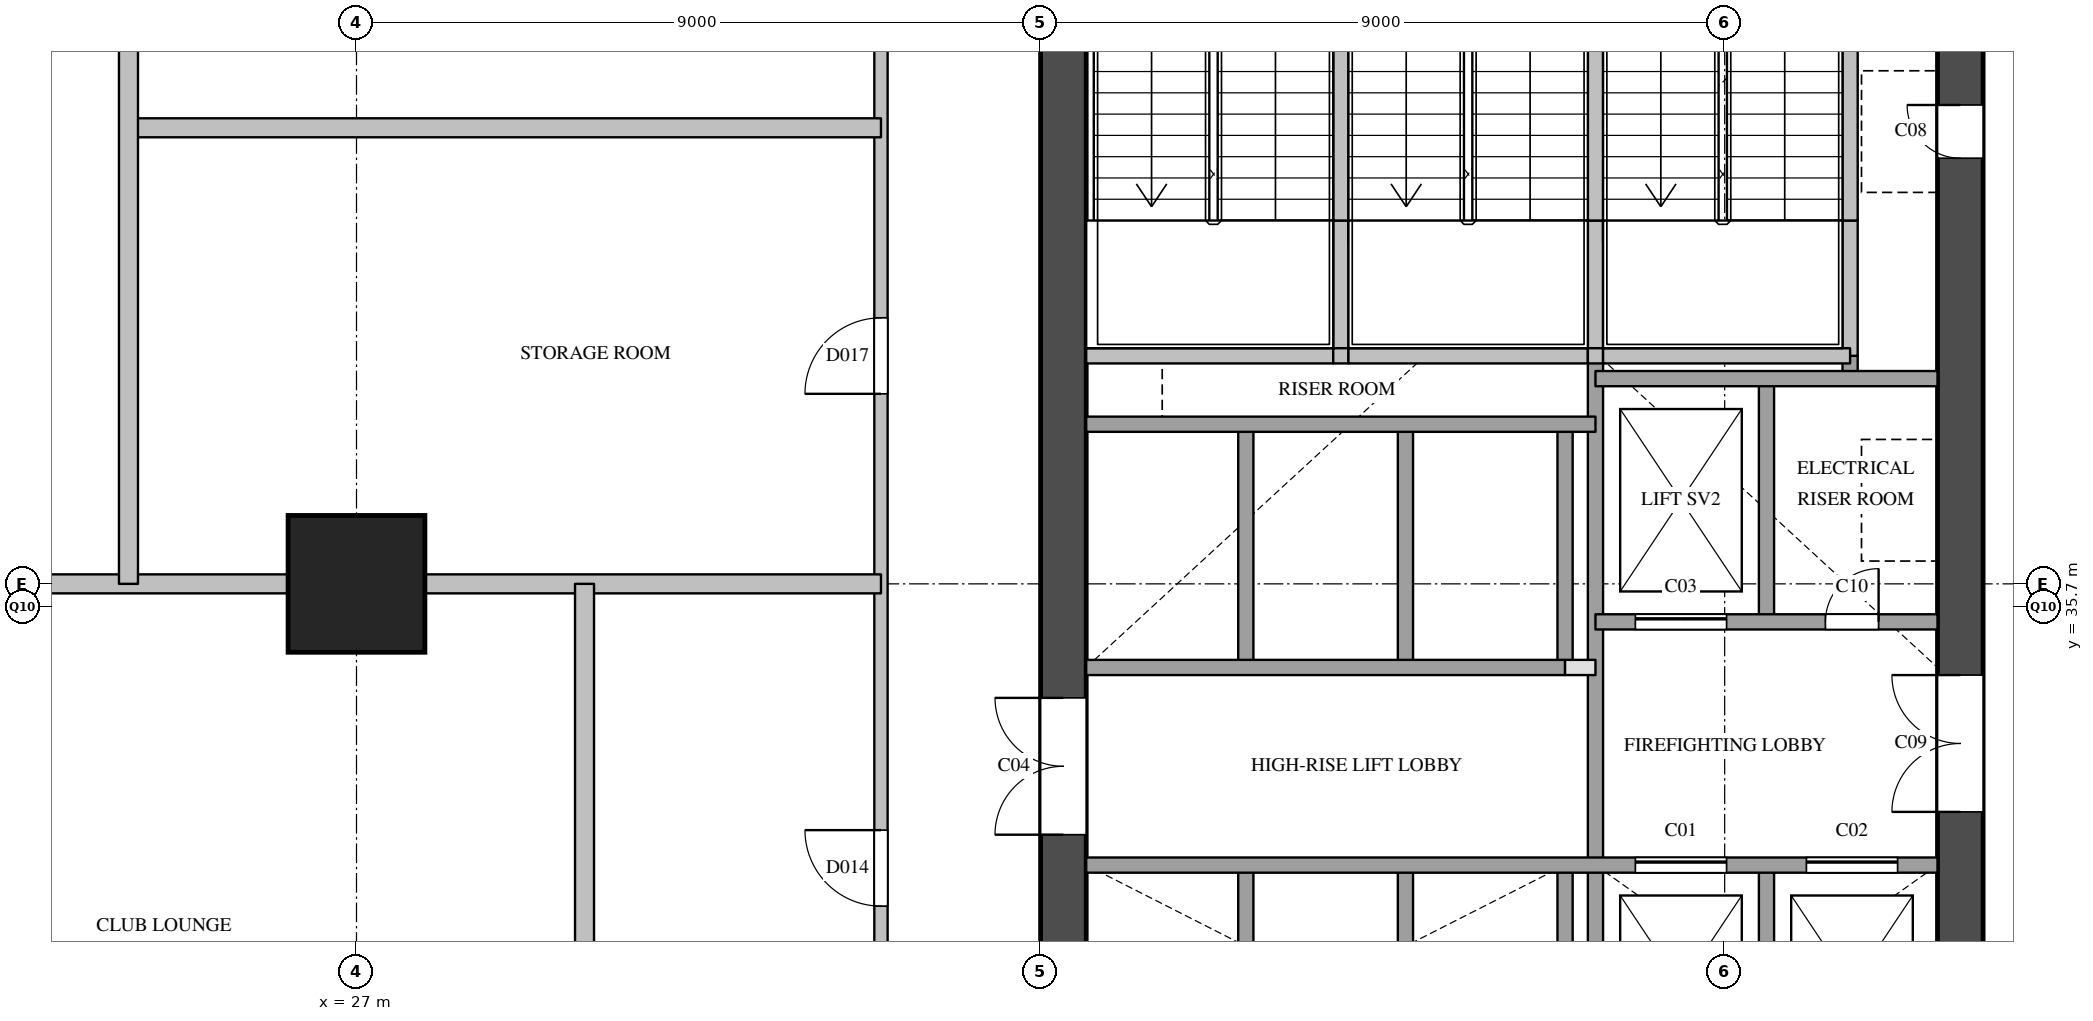
"""IFC4 building model, lengths in metres.
Left out: names, types, materials, properties, quantities, classifications, styles, units other than length and angle.
Written with IfcOpenShell. Run it as: python <this file> out.ifc"""

import sys

from ifc_helpers import new_model, si_unit, direction, frame, frame_2d, origin, origin_2d, place, context, subcontext, project, spatial, rectangle, extrude, element, fill, save


model = new_model("IFC4")
c1 = context("Model", 3, precision=1e-05, world=origin(), true_north=direction((0.0, 1.0)))
c2 = subcontext(c1, "Body", "Model", "MODEL_VIEW")
j1 = project(units=[si_unit("LENGTHUNIT", "METRE"), si_unit("PLANEANGLEUNIT", "RADIAN")], contexts=[c1])
p1 = place(None, origin())
s1 = spatial("IfcSite", under=j1, at=p1, CompositionType="ELEMENT")
p2 = place(p1, origin())
s2 = spatial("IfcBuilding", under=s1, at=p2, CompositionType="ELEMENT")
p3 = place(p2, frame((0.0, 0.0, 93.0)))
s3 = spatial("IfcBuildingStorey", under=s2, at=p3, CompositionType="ELEMENT", Elevation=93.0)
p4 = place(p3, frame((27.0, 36.0, 0.0), z_axis=(0.0, 0.0, 1.0), x_axis=(1.0, 0.0, 0.0)))
e1 = element("IfcColumn", 1, at=p4, inside=s3, PredefinedType="COLUMN", context=c2, shape_type="SweptSolid", body=[
    extrude(rectangle(XDim=1.8, YDim=1.8, at=origin_2d()), origin(), (0.0, 0.0, 1.0), 3.8),
])
p5 = place(p3, frame((36.3, 29.1, 0.0), z_axis=(0.0, 0.0, 1.0), x_axis=(0.0, 1.0, 0.0)))
e2 = element("IfcWall", 2, at=p5, inside=s3, PredefinedType="SHEAR", context=c2, shape_type="SweptSolid", body=[
    extrude(rectangle(XDim=20.3, YDim=0.6, at=frame_2d((10.15, 0.0))), origin(), (0.0, 0.0, 1.0), 3.5),
])
p6 = place(p5, frame((3.6, 0.0, 0.0)))
e3 = element("IfcOpeningElement", 3, at=p6, cuts=e2, PredefinedType="OPENING", context=c2, shape_type="SweptSolid", body=[
    extrude(rectangle(XDim=1.8, YDim=2.1, at=frame_2d((0.9, 1.05))), frame((0.0, 0.31, 0.0), z_axis=(0.0, -1.0, 0.0), x_axis=(1.0, 0.0, 0.0)), (0.0, 0.0, 1.0), 0.62),
])
p7 = place(p5, frame((16.4, 0.0, 0.0)))
e4 = element("IfcOpeningElement", 4, at=p7, cuts=e2, PredefinedType="OPENING", context=c2, shape_type="SweptSolid", body=[
    extrude(rectangle(XDim=1.0, YDim=2.1, at=frame_2d((0.5, 1.05))), frame((0.0, 0.31, 0.0), z_axis=(0.0, -1.0, 0.0), x_axis=(1.0, 0.0, 0.0)), (0.0, 0.0, 1.0), 0.62),
])
p8 = place(p3, frame((48.1, 29.1, 0.0), z_axis=(0.0, 0.0, 1.0), x_axis=(0.0, 1.0, 0.0)))
e5 = element("IfcWall", 5, at=p8, inside=s3, PredefinedType="SHEAR", context=c2, shape_type="SweptSolid", body=[
    extrude(rectangle(XDim=20.3, YDim=0.6, at=frame_2d((10.15, 0.0))), origin(), (0.0, 0.0, 1.0), 3.5),
])
p9 = place(p8, frame((12.5, 0.0, 0.0)))
e6 = element("IfcOpeningElement", 6, at=p9, cuts=e5, PredefinedType="OPENING", context=c2, shape_type="SweptSolid", body=[
    extrude(rectangle(XDim=0.7, YDim=2.1, at=frame_2d((0.35, 1.05))), frame((0.0, 0.31, 0.0), z_axis=(0.0, -1.0, 0.0), x_axis=(1.0, 0.0, 0.0)), (0.0, 0.0, 1.0), 0.62),
])
p10 = place(p8, frame((3.9, 0.0, 0.0)))
e7 = element("IfcOpeningElement", 7, at=p10, cuts=e5, PredefinedType="OPENING", context=c2, shape_type="SweptSolid", body=[
    extrude(rectangle(XDim=1.8, YDim=2.1, at=frame_2d((0.9, 1.05))), frame((0.0, 0.31, 0.0), z_axis=(0.0, -1.0, 0.0), x_axis=(1.0, 0.0, 0.0)), (0.0, 0.0, 1.0), 0.62),
])
p11 = place(p3, frame((38.7, 29.1, 0.0), z_axis=(0.0, 0.0, 1.0), x_axis=(0.0, 1.0, 0.0)))
e8 = element("IfcWall", 8, at=p11, inside=s3, PredefinedType="SOLIDWALL", context=c2, shape_type="SweptSolid", body=[
    extrude(rectangle(XDim=3.2, YDim=0.2, at=frame_2d((1.6, 0.0))), origin(), (0.0, 0.0, 1.0), 3.5),
])
p12 = place(p3, frame((38.7, 34.9, 0.0), z_axis=(0.0, 0.0, 1.0), x_axis=(0.0, 1.0, 0.0)))
e9 = element("IfcWall", 9, at=p12, inside=s3, PredefinedType="SOLIDWALL", context=c2, shape_type="SweptSolid", body=[
    extrude(rectangle(XDim=3.2, YDim=0.2, at=frame_2d((1.6, 0.0))), origin(), (0.0, 0.0, 1.0), 3.5),
])
p13 = place(p3, frame((39.95, 39.0, 0.0), z_axis=(0.0, 0.0, 1.0), x_axis=(0.0, 1.0, 0.0)))
e10 = element("IfcWall", 10, at=p13, inside=s3, PredefinedType="SOLIDWALL", context=c2, shape_type="SweptSolid", body=[
    extrude(rectangle(XDim=1.78, YDim=0.2, at=frame_2d((0.89, 0.0))), origin(), (0.0, 0.0, 1.0), 3.5),
])
p14 = place(p3, frame((39.95, 40.78, 0.0), z_axis=(0.0, 0.0, 1.0), x_axis=(0.0, 1.0, 0.0)))
e11 = element("IfcWall", 11, at=p14, inside=s3, PredefinedType="SOLIDWALL", context=c2, shape_type="SweptSolid", body=[
    extrude(rectangle(XDim=4.42, YDim=0.2, at=frame_2d((2.21, 0.0))), origin(), (0.0, 0.0, 1.0), 3.5),
])
p15 = place(p3, frame((40.8, 29.1, 0.0), z_axis=(0.0, 0.0, 1.0), x_axis=(0.0, 1.0, 0.0)))
e12 = element("IfcWall", 12, at=p15, inside=s3, PredefinedType="SOLIDWALL", context=c2, shape_type="SweptSolid", body=[
    extrude(rectangle(XDim=3.2, YDim=0.2, at=frame_2d((1.6, 0.0))), origin(), (0.0, 0.0, 1.0), 3.5),
])
p16 = place(p3, frame((40.8, 34.9, 0.0), z_axis=(0.0, 0.0, 1.0), x_axis=(0.0, 1.0, 0.0)))
e13 = element("IfcWall", 13, at=p16, inside=s3, PredefinedType="SOLIDWALL", context=c2, shape_type="SweptSolid", body=[
    extrude(rectangle(XDim=3.2, YDim=0.2, at=frame_2d((1.6, 0.0))), origin(), (0.0, 0.0, 1.0), 3.5),
])
p17 = place(p3, frame((42.9, 29.1, 0.0), z_axis=(0.0, 0.0, 1.0), x_axis=(0.0, 1.0, 0.0)))
e14 = element("IfcWall", 14, at=p17, inside=s3, PredefinedType="SOLIDWALL", context=c2, shape_type="SweptSolid", body=[
    extrude(rectangle(XDim=3.2, YDim=0.2, at=frame_2d((1.6, 0.0))), origin(), (0.0, 0.0, 1.0), 3.5),
])
p18 = place(p3, frame((42.9, 34.9, 0.0), z_axis=(0.0, 0.0, 1.0), x_axis=(0.0, 1.0, 0.0)))
e15 = element("IfcWall", 15, at=p18, inside=s3, PredefinedType="SOLIDWALL", context=c2, shape_type="SweptSolid", body=[
    extrude(rectangle(XDim=3.2, YDim=0.2, at=frame_2d((1.6, 0.0))), origin(), (0.0, 0.0, 1.0), 3.5),
])
p19 = place(p3, frame((43.3, 29.1, 0.0), z_axis=(0.0, 0.0, 1.0), x_axis=(0.0, 1.0, 0.0)))
e16 = element("IfcWall", 16, at=p19, inside=s3, PredefinedType="SOLIDWALL", context=c2, shape_type="SweptSolid", body=[
    extrude(rectangle(XDim=9.9, YDim=0.2, at=frame_2d((4.95, 0.0))), origin(), (0.0, 0.0, 1.0), 3.5),
])
p20 = place(p3, frame((43.3, 39.0, 0.0), z_axis=(0.0, 0.0, 1.0), x_axis=(0.0, 1.0, 0.0)))
e17 = element("IfcWall", 17, at=p20, inside=s3, PredefinedType="SOLIDWALL", context=c2, shape_type="SweptSolid", body=[
    extrude(rectangle(XDim=1.78, YDim=0.2, at=frame_2d((0.89, 0.0))), origin(), (0.0, 0.0, 1.0), 3.5),
])
p21 = place(p3, frame((43.3, 40.78, 0.0), z_axis=(0.0, 0.0, 1.0), x_axis=(0.0, 1.0, 0.0)))
e18 = element("IfcWall", 18, at=p21, inside=s3, PredefinedType="SOLIDWALL", context=c2, shape_type="SweptSolid", body=[
    extrude(rectangle(XDim=4.42, YDim=0.2, at=frame_2d((2.21, 0.0))), origin(), (0.0, 0.0, 1.0), 3.5),
])
for number, where, z_axis, x_axis in (
    (19, (45.55, 29.1, 0.0), (0.0, 0.0, 1.0), (0.0, 1.0, 0.0)),
    (20, (45.55, 35.5, 0.0), (0.0, 0.0, 1.0), (0.0, 1.0, 0.0)),
):
    element("IfcWall", number, at=place(p3, frame(where, z_axis=z_axis, x_axis=x_axis)), inside=s3, PredefinedType="SOLIDWALL", context=c2, shape_type="SweptSolid", body=[
        extrude(rectangle(XDim=3.2, YDim=0.2, at=frame_2d((1.6, 0.0))), origin(), (0.0, 0.0, 1.0), 3.5),
    ])
p22 = place(p3, frame((46.65, 38.7, 0.0), z_axis=(0.0, 0.0, 1.0), x_axis=(0.0, 1.0, 0.0)))
e21 = element("IfcWall", 21, at=p22, inside=s3, PredefinedType="SOLIDWALL", context=c2, shape_type="SweptSolid", body=[
    extrude(rectangle(XDim=0.3, YDim=0.2, at=frame_2d((0.15, 0.0))), origin(), (0.0, 0.0, 1.0), 3.5),
])
p23 = place(p3, frame((46.65, 39.0, 0.0), z_axis=(0.0, 0.0, 1.0), x_axis=(0.0, 1.0, 0.0)))
e22 = element("IfcWall", 22, at=p23, inside=s3, PredefinedType="SOLIDWALL", context=c2, shape_type="SweptSolid", body=[
    extrude(rectangle(XDim=1.78, YDim=0.2, at=frame_2d((0.89, 0.0))), origin(), (0.0, 0.0, 1.0), 3.5),
])
p24 = place(p3, frame((46.65, 40.78, 0.0), z_axis=(0.0, 0.0, 1.0), x_axis=(0.0, 1.0, 0.0)))
e23 = element("IfcWall", 23, at=p24, inside=s3, PredefinedType="SOLIDWALL", context=c2, shape_type="SweptSolid", body=[
    extrude(rectangle(XDim=4.42, YDim=0.2, at=frame_2d((2.21, 0.0))), origin(), (0.0, 0.0, 1.0), 3.5),
])
p25 = place(p3, frame((36.6, 32.3, 0.0), z_axis=(0.0, 0.0, 1.0), x_axis=(1.0, 0.0, 0.0)))
e24 = element("IfcWall", 24, at=p25, inside=s3, PredefinedType="SOLIDWALL", context=c2, shape_type="SweptSolid", body=[
    extrude(rectangle(XDim=11.2, YDim=0.2, at=frame_2d((5.6, 0.0))), origin(), (0.0, 0.0, 1.0), 3.5),
])
p26 = place(p25, frame((7.225, 0.0, 0.0)))
e25 = element("IfcOpeningElement", 25, at=p26, cuts=e24, PredefinedType="OPENING", context=c2, shape_type="SweptSolid", body=[
    extrude(rectangle(XDim=1.2, YDim=2.1, at=frame_2d((0.6, 1.05))), frame((0.0, 0.11, 0.0), z_axis=(0.0, -1.0, 0.0), x_axis=(1.0, 0.0, 0.0)), (0.0, 0.0, 1.0), 0.22),
])
p27 = place(p25, frame((9.475, 0.0, 0.0)))
e26 = element("IfcOpeningElement", 26, at=p27, cuts=e24, PredefinedType="OPENING", context=c2, shape_type="SweptSolid", body=[
    extrude(rectangle(XDim=1.2, YDim=2.1, at=frame_2d((0.6, 1.05))), frame((0.0, 0.11, 0.0), z_axis=(0.0, -1.0, 0.0), x_axis=(1.0, 0.0, 0.0)), (0.0, 0.0, 1.0), 0.22),
])
p28 = place(p3, frame((42.9, 34.9, 0.0), z_axis=(0.0, 0.0, 1.0), x_axis=(1.0, 0.0, 0.0)))
e27 = element("IfcWall", 27, at=p28, inside=s3, PredefinedType="PARTITIONING", context=c2, shape_type="SweptSolid", body=[
    extrude(rectangle(XDim=0.4, YDim=0.2, at=frame_2d((0.2, 0.0))), origin(), (0.0, 0.0, 1.0), 3.5),
])
p29 = place(p3, frame((36.6, 34.9, 0.0), z_axis=(0.0, 0.0, 1.0), x_axis=(1.0, 0.0, 0.0)))
e28 = element("IfcWall", 28, at=p29, inside=s3, PredefinedType="SOLIDWALL", context=c2, shape_type="SweptSolid", body=[
    extrude(rectangle(XDim=6.3, YDim=0.2, at=frame_2d((3.15, 0.0))), origin(), (0.0, 0.0, 1.0), 3.5),
])
p30 = place(p3, frame((43.3, 35.5, 0.0), z_axis=(0.0, 0.0, 1.0), x_axis=(1.0, 0.0, 0.0)))
e29 = element("IfcWall", 29, at=p30, inside=s3, PredefinedType="SOLIDWALL", context=c2, shape_type="SweptSolid", body=[
    extrude(rectangle(XDim=4.5, YDim=0.2, at=frame_2d((2.25, 0.0))), origin(), (0.0, 0.0, 1.0), 3.5),
])
p31 = place(p30, frame((0.525, 0.0, 0.0)))
e30 = element("IfcOpeningElement", 30, at=p31, cuts=e29, PredefinedType="OPENING", context=c2, shape_type="SweptSolid", body=[
    extrude(rectangle(XDim=1.2, YDim=2.1, at=frame_2d((0.6, 1.05))), frame((0.0, 0.11, 0.0), z_axis=(0.0, -1.0, 0.0), x_axis=(1.0, 0.0, 0.0)), (0.0, 0.0, 1.0), 0.22),
])
p32 = place(p30, frame((3.025, 0.0, 0.0)))
e31 = element("IfcOpeningElement", 31, at=p32, cuts=e29, PredefinedType="OPENING", context=c2, shape_type="SweptSolid", body=[
    extrude(rectangle(XDim=0.7, YDim=2.1, at=frame_2d((0.35, 1.05))), frame((0.0, 0.11, 0.0), z_axis=(0.0, -1.0, 0.0), x_axis=(1.0, 0.0, 0.0)), (0.0, 0.0, 1.0), 0.22),
])
p33 = place(p3, frame((36.6, 38.1, 0.0), z_axis=(0.0, 0.0, 1.0), x_axis=(1.0, 0.0, 0.0)))
e32 = element("IfcWall", 32, at=p33, inside=s3, PredefinedType="SOLIDWALL", context=c2, shape_type="SweptSolid", body=[
    extrude(rectangle(XDim=6.7, YDim=0.2, at=frame_2d((3.35, 0.0))), origin(), (0.0, 0.0, 1.0), 3.5),
])
p34 = place(p3, frame((43.3, 38.7, 0.0), z_axis=(0.0, 0.0, 1.0), x_axis=(1.0, 0.0, 0.0)))
e33 = element("IfcWall", 33, at=p34, inside=s3, PredefinedType="SOLIDWALL", context=c2, shape_type="SweptSolid", body=[
    extrude(rectangle(XDim=4.5, YDim=0.2, at=frame_2d((2.25, 0.0))), origin(), (0.0, 0.0, 1.0), 3.5),
])
p35 = place(p3, frame((36.6, 39.0, 0.0), z_axis=(0.0, 0.0, 1.0), x_axis=(1.0, 0.0, 0.0)))
e34 = element("IfcWall", 34, at=p35, inside=s3, PredefinedType="SOLIDWALL", context=c2, shape_type="SweptSolid", body=[
    extrude(rectangle(XDim=3.25, YDim=0.2, at=frame_2d((1.625, 0.0))), origin(), (0.0, 0.0, 1.0), 3.5),
])
p36 = place(p3, frame((39.85, 39.0, 0.0), z_axis=(0.0, 0.0, 1.0), x_axis=(1.0, 0.0, 0.0)))
e35 = element("IfcWall", 35, at=p36, inside=s3, PredefinedType="SOLIDWALL", context=c2, shape_type="SweptSolid", body=[
    extrude(rectangle(XDim=0.2, YDim=0.2, at=frame_2d((0.1, 0.0))), origin(), (0.0, 0.0, 1.0), 3.5),
])
p37 = place(p3, frame((40.05, 39.0, 0.0), z_axis=(0.0, 0.0, 1.0), x_axis=(1.0, 0.0, 0.0)))
e36 = element("IfcWall", 36, at=p37, inside=s3, PredefinedType="SOLIDWALL", context=c2, shape_type="SweptSolid", body=[
    extrude(rectangle(XDim=3.15, YDim=0.2, at=frame_2d((1.575, 0.0))), origin(), (0.0, 0.0, 1.0), 3.5),
])
p38 = place(p3, frame((43.2, 39.0, 0.0), z_axis=(0.0, 0.0, 1.0), x_axis=(1.0, 0.0, 0.0)))
e37 = element("IfcWall", 37, at=p38, inside=s3, PredefinedType="SOLIDWALL", context=c2, shape_type="SweptSolid", body=[
    extrude(rectangle(XDim=0.2, YDim=0.2, at=frame_2d((0.1, 0.0))), origin(), (0.0, 0.0, 1.0), 3.5),
])
p39 = place(p3, frame((43.4, 39.0, 0.0), z_axis=(0.0, 0.0, 1.0), x_axis=(1.0, 0.0, 0.0)))
e38 = element("IfcWall", 38, at=p39, inside=s3, PredefinedType="SOLIDWALL", context=c2, shape_type="SweptSolid", body=[
    extrude(rectangle(XDim=3.25, YDim=0.2, at=frame_2d((1.625, 0.0))), origin(), (0.0, 0.0, 1.0), 3.5),
])
p40 = place(p3, frame((33.9, 28.52, 0.0), z_axis=(0.0, 0.0, 1.0), x_axis=(0.0, 1.0, 0.0)))
e39 = element("IfcWall", 39, at=p40, inside=s3, PredefinedType="PARTITIONING", context=c2, shape_type="SweptSolid", body=[
    extrude(rectangle(XDim=23.58, YDim=0.175, at=frame_2d((11.79, 0.0))), origin(), (0.0, 0.0, 1.0), 3.5),
])
p41 = place(p40, frame((3.24, 0.0, 0.0)))
e40 = element("IfcOpeningElement", 40, at=p41, cuts=e39, PredefinedType="OPENING", context=c2, shape_type="SweptSolid", body=[
    extrude(rectangle(XDim=1.0, YDim=2.1, at=frame_2d((0.5, 1.05))), frame((0.0, 0.097, 0.0), z_axis=(0.0, -1.0, 0.0), x_axis=(1.0, 0.0, 0.0)), (0.0, 0.0, 1.0), 0.195),
])
p42 = place(p40, frame((9.98, 0.0, 0.0)))
e41 = element("IfcOpeningElement", 41, at=p42, cuts=e39, PredefinedType="OPENING", context=c2, shape_type="SweptSolid", body=[
    extrude(rectangle(XDim=1.0, YDim=2.1, at=frame_2d((0.5, 1.05))), frame((0.0, 0.097, 0.0), z_axis=(0.0, -1.0, 0.0), x_axis=(1.0, 0.0, 0.0)), (0.0, 0.0, 1.0), 0.195),
])
p43 = place(p40, frame((18.08, 0.0, 0.0)))
e42 = element("IfcOpeningElement", 42, at=p43, cuts=e39, PredefinedType="OPENING", context=c2, shape_type="SweptSolid", body=[
    extrude(rectangle(XDim=0.9, YDim=2.1, at=frame_2d((0.45, 1.05))), frame((0.0, 0.097, 0.0), z_axis=(0.0, -1.0, 0.0), x_axis=(1.0, 0.0, 0.0)), (0.0, 0.0, 1.0), 0.195),
])
p44 = place(p3, frame((20.1, 36.0, 0.0), z_axis=(0.0, 0.0, 1.0), x_axis=(1.0, 0.0, 0.0)))
e43 = element("IfcWall", 43, at=p44, inside=s3, PredefinedType="PARTITIONING", context=c2, shape_type="SweptSolid", body=[
    extrude(rectangle(XDim=13.8, YDim=0.25, at=frame_2d((6.9, 0.0))), origin(), (0.0, 0.0, 1.0), 3.5),
])
p45 = place(p3, frame((24.0, 42.0, 0.0), z_axis=(0.0, 0.0, 1.0), x_axis=(1.0, 0.0, 0.0)))
e44 = element("IfcWall", 44, at=p45, inside=s3, PredefinedType="PARTITIONING", context=c2, shape_type="SweptSolid", body=[
    extrude(rectangle(XDim=9.9, YDim=0.25, at=frame_2d((4.95, 0.0))), origin(), (0.0, 0.0, 1.0), 2.5),
])
p46 = place(p3, frame((24.0, 36.0, 0.0), z_axis=(0.0, 0.0, 1.0), x_axis=(0.0, 1.0, 0.0)))
e45 = element("IfcWall", 45, at=p46, inside=s3, PredefinedType="PARTITIONING", context=c2, shape_type="SweptSolid", body=[
    extrude(rectangle(XDim=18.0, YDim=0.25, at=frame_2d((9.0, 0.0))), origin(), (0.0, 0.0, 1.0), 2.5),
])
p47 = place(p3, frame((30.0, 24.0, 0.0), z_axis=(0.0, 0.0, 1.0), x_axis=(0.0, 1.0, 0.0)))
e46 = element("IfcWall", 46, at=p47, inside=s3, PredefinedType="PARTITIONING", context=c2, shape_type="SweptSolid", body=[
    extrude(rectangle(XDim=12.0, YDim=0.25, at=frame_2d((6.0, 0.0))), origin(), (0.0, 0.0, 1.0), 2.5),
])
p48 = place(p26, origin())
e47 = element("IfcDoor", 47, at=p48, inside=s3, OperationType="SLIDING_TO_LEFT", PredefinedType="DOOR", context=c2, shape_type="SweptSolid", body=[
    extrude(rectangle(XDim=1.2, YDim=2.1, at=frame_2d((0.6, 1.05))), frame((0.0, 0.025, 0.0), z_axis=(0.0, -1.0, 0.0), x_axis=(1.0, 0.0, 0.0)), (0.0, 0.0, 1.0), 0.05),
])
fill(e25, e47)
p49 = place(p27, origin())
e48 = element("IfcDoor", 48, at=p49, inside=s3, OperationType="SLIDING_TO_LEFT", PredefinedType="DOOR", context=c2, shape_type="SweptSolid", body=[
    extrude(rectangle(XDim=1.2, YDim=2.1, at=frame_2d((0.6, 1.05))), frame((0.0, 0.025, 0.0), z_axis=(0.0, -1.0, 0.0), x_axis=(1.0, 0.0, 0.0)), (0.0, 0.0, 1.0), 0.05),
])
fill(e26, e48)
p50 = place(p31, origin())
e49 = element("IfcDoor", 49, at=p50, inside=s3, OperationType="SLIDING_TO_LEFT", PredefinedType="DOOR", context=c2, shape_type="SweptSolid", body=[
    extrude(rectangle(XDim=1.2, YDim=2.1, at=frame_2d((0.6, 1.05))), frame((0.0, 0.025, 0.0), z_axis=(0.0, -1.0, 0.0), x_axis=(1.0, 0.0, 0.0)), (0.0, 0.0, 1.0), 0.05),
])
fill(e30, e49)
p51 = place(p6, origin())
e50 = element("IfcDoor", 50, at=p51, inside=s3, OperationType="DOUBLE_DOOR_SINGLE_SWING", PredefinedType="DOOR", context=c2, shape_type="SweptSolid", body=[
    extrude(rectangle(XDim=1.8, YDim=2.1, at=frame_2d((0.9, 1.05))), frame((0.0, 0.025, 0.0), z_axis=(0.0, -1.0, 0.0), x_axis=(1.0, 0.0, 0.0)), (0.0, 0.0, 1.0), 0.05),
])
fill(e3, e50)
p52 = place(p9, origin())
e51 = element("IfcDoor", 51, at=p52, inside=s3, OperationType="SINGLE_SWING_RIGHT", PredefinedType="DOOR", context=c2, shape_type="SweptSolid", body=[
    extrude(rectangle(XDim=0.7, YDim=2.1, at=frame_2d((0.35, 1.05))), frame((0.0, 0.025, 0.0), z_axis=(0.0, -1.0, 0.0), x_axis=(1.0, 0.0, 0.0)), (0.0, 0.0, 1.0), 0.05),
])
fill(e6, e51)
p53 = place(p10, origin())
e52 = element("IfcDoor", 52, at=p53, inside=s3, OperationType="DOUBLE_DOOR_SINGLE_SWING", PredefinedType="DOOR", context=c2, shape_type="SweptSolid", body=[
    extrude(rectangle(XDim=1.8, YDim=2.1, at=frame_2d((0.9, 1.05))), frame((0.0, 0.025, 0.0), z_axis=(0.0, -1.0, 0.0), x_axis=(1.0, 0.0, 0.0)), (0.0, 0.0, 1.0), 0.05),
])
fill(e7, e52)
p54 = place(p32, origin())
e53 = element("IfcDoor", 53, at=p54, inside=s3, OperationType="SINGLE_SWING_RIGHT", PredefinedType="DOOR", context=c2, shape_type="SweptSolid", body=[
    extrude(rectangle(XDim=0.7, YDim=2.1, at=frame_2d((0.35, 1.05))), frame((0.0, 0.025, 0.0), z_axis=(0.0, -1.0, 0.0), x_axis=(1.0, 0.0, 0.0)), (0.0, 0.0, 1.0), 0.05),
])
fill(e31, e53)
p55 = place(p41, origin())
e54 = element("IfcDoor", 54, at=p55, inside=s3, OperationType="SINGLE_SWING_RIGHT", PredefinedType="DOOR", context=c2, shape_type="SweptSolid", body=[
    extrude(rectangle(XDim=1.0, YDim=2.1, at=frame_2d((0.5, 1.05))), frame((0.0, 0.025, 0.0), z_axis=(0.0, -1.0, 0.0), x_axis=(1.0, 0.0, 0.0)), (0.0, 0.0, 1.0), 0.05),
])
fill(e40, e54)
p56 = place(p42, origin())
e55 = element("IfcDoor", 55, at=p56, inside=s3, OperationType="SINGLE_SWING_LEFT", PredefinedType="DOOR", context=c2, shape_type="SweptSolid", body=[
    extrude(rectangle(XDim=1.0, YDim=2.1, at=frame_2d((0.5, 1.05))), frame((0.0, 0.025, 0.0), z_axis=(0.0, -1.0, 0.0), x_axis=(1.0, 0.0, 0.0)), (0.0, 0.0, 1.0), 0.05),
])
fill(e41, e55)
save(model, sys.argv[1])
